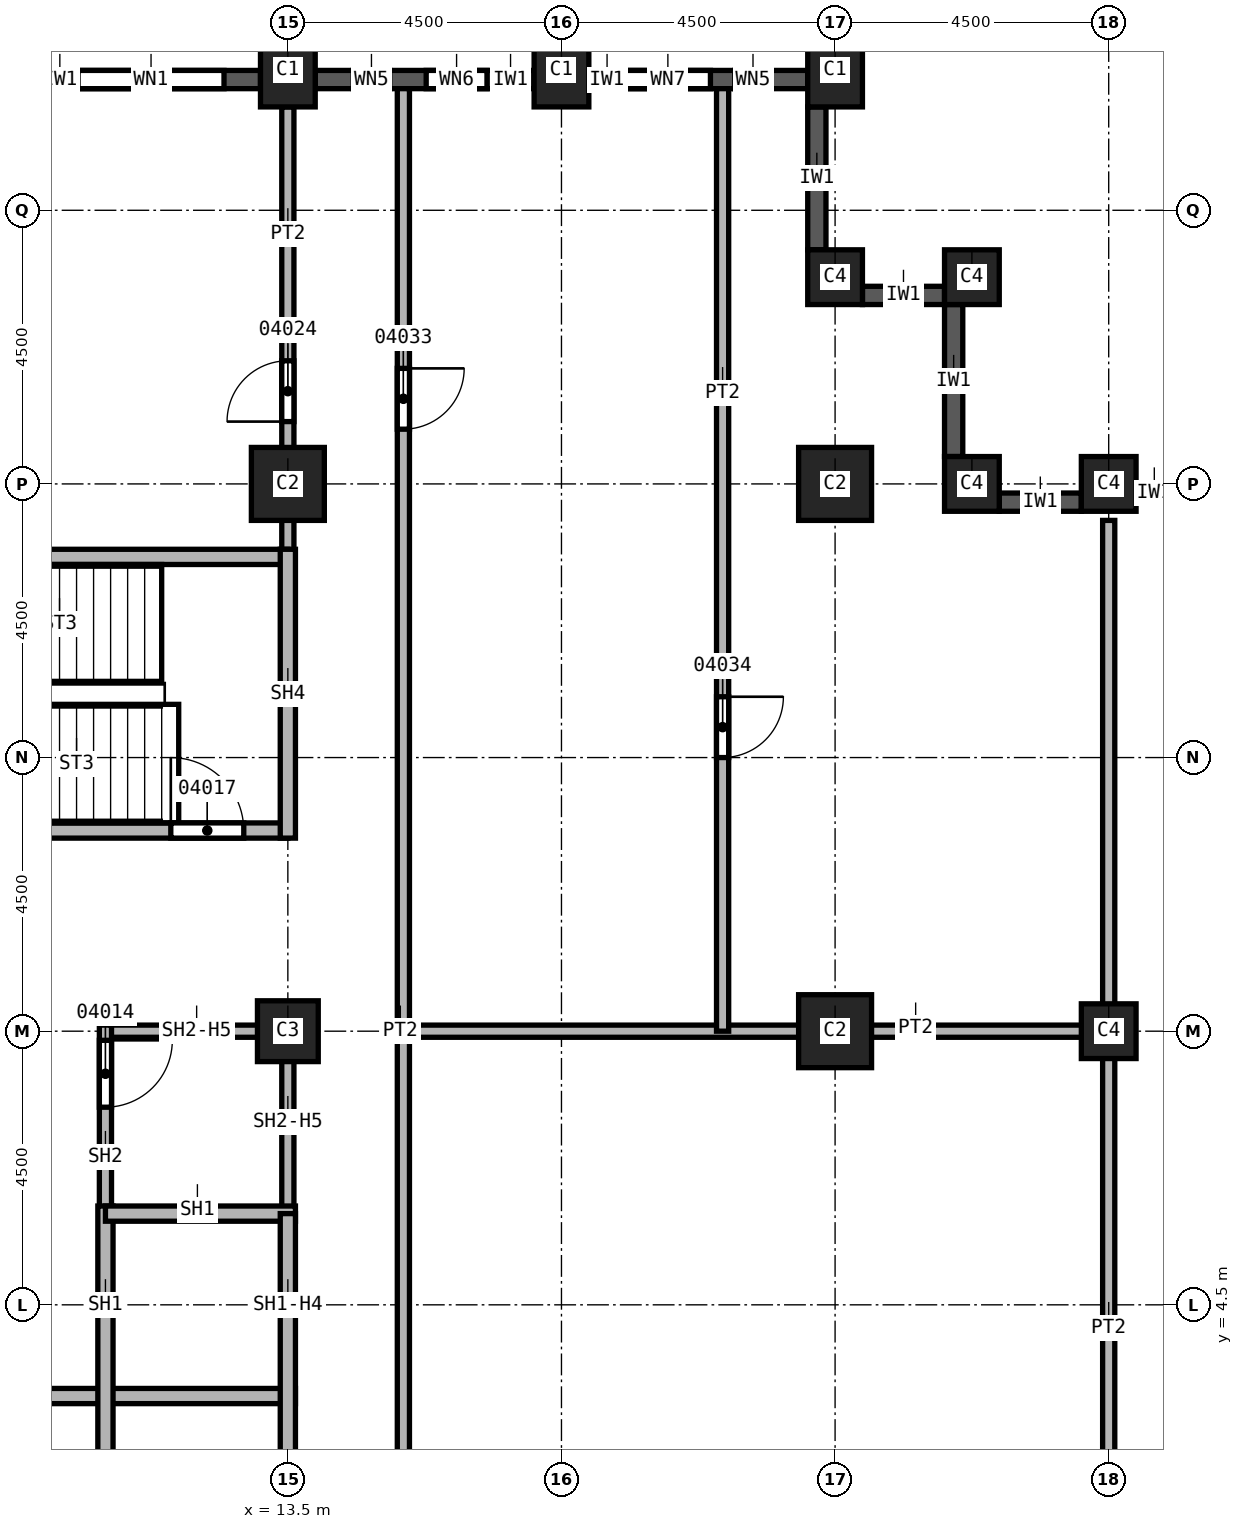
"""IFC4 building model, lengths in metres.
Left out: names, types, materials, properties, quantities, classifications, styles, units other than length and angle.
Written with IfcOpenShell. Run it as: python <this file> out.ifc"""

import sys

from ifc_helpers import new_model, si_unit, direction, frame, frame_2d, origin, origin_2d, place, context, subcontext, project, spatial, rectangle, extrude, element, fill, save


model = new_model("IFC4")
c1 = context("Model", 3, precision=1e-05, world=origin(), true_north=direction((0.0, 1.0)))
c2 = subcontext(c1, "Body", "Model", "MODEL_VIEW")
j1 = project(units=[si_unit("LENGTHUNIT", "METRE"), si_unit("PLANEANGLEUNIT", "RADIAN")], contexts=[c1])
p1 = place(None, origin())
s1 = spatial("IfcSite", under=j1, at=p1, CompositionType="ELEMENT")
p2 = place(p1, origin())
s2 = spatial("IfcBuilding", under=s1, at=p2, CompositionType="ELEMENT")
p3 = place(p2, frame((0.0, 0.0, 104.0)))
s3 = spatial("IfcBuildingStorey", under=s2, at=p3, CompositionType="ELEMENT", Elevation=104.0)
for number, where, z_axis, x_axis in (
    (1, (13.5, 18.0, 0.0), (0.0, 0.0, 1.0), (1.0, 0.0, 0.0)),
    (2, (22.5, 9.0, 0.0), (0.0, 0.0, 1.0), (1.0, 0.0, 0.0)),
    (3, (22.5, 18.0, 0.0), (0.0, 0.0, 1.0), (1.0, 0.0, 0.0)),
):
    element("IfcColumn", number, at=place(p3, frame(where, z_axis=z_axis, x_axis=x_axis)), inside=s3, PredefinedType="COLUMN", context=c2, shape_type="SweptSolid", body=[
        extrude(rectangle(XDim=1.2, YDim=1.2, at=origin_2d()), origin(), (0.0, 0.0, 1.0), 3.7),
    ])
p4 = place(p3, frame((13.5, 9.0, 0.0), z_axis=(0.0, 0.0, 1.0), x_axis=(1.0, 0.0, 0.0)))
e4 = element("IfcColumn", 4, at=p4, inside=s3, PredefinedType="COLUMN", context=c2, shape_type="SweptSolid", body=[
    extrude(rectangle(XDim=1.0, YDim=1.0, at=origin_2d()), origin(), (0.0, 0.0, 1.0), 3.7),
])
for number, where, z_axis, x_axis in (
    (5, (27.0, 9.0, 0.0), (0.0, 0.0, 1.0), (1.0, 0.0, 0.0)),
    (6, (27.0, 18.0, 0.0), (0.0, 0.0, 1.0), (1.0, 0.0, 0.0)),
):
    element("IfcColumn", number, at=place(p3, frame(where, z_axis=z_axis, x_axis=x_axis)), inside=s3, PredefinedType="COLUMN", context=c2, shape_type="SweptSolid", body=[
        extrude(rectangle(XDim=0.9, YDim=0.9, at=origin_2d()), origin(), (0.0, 0.0, 1.0), 3.7),
    ])
for number, where, z_axis, x_axis in (
    (7, (13.5, 24.8, 0.0), (0.0, 0.0, 1.0), (1.0, 0.0, 0.0)),
    (8, (18.0, 24.8, 0.0), (0.0, 0.0, 1.0), (1.0, 0.0, 0.0)),
    (9, (22.5, 24.8, 0.0), (0.0, 0.0, 1.0), (1.0, 0.0, 0.0)),
):
    element("IfcColumn", number, at=place(p3, frame(where, z_axis=z_axis, x_axis=x_axis)), inside=s3, PredefinedType="COLUMN", context=c2, shape_type="SweptSolid", body=[
        extrude(rectangle(XDim=0.9, YDim=1.2, at=origin_2d()), origin(), (0.0, 0.0, 1.0), 3.7),
    ])
for number, where, z_axis, x_axis in (
    (10, (22.5, 21.4, 0.0), (0.0, 0.0, 1.0), (1.0, 0.0, 0.0)),
    (11, (24.75, 21.4, 0.0), (0.0, 0.0, 1.0), (1.0, 0.0, 0.0)),
    (12, (24.75, 18.0, 0.0), (0.0, 0.0, 1.0), (1.0, 0.0, 0.0)),
):
    element("IfcColumn", number, at=place(p3, frame(where, z_axis=z_axis, x_axis=x_axis)), inside=s3, PredefinedType="COLUMN", context=c2, shape_type="SweptSolid", body=[
        extrude(rectangle(XDim=0.9, YDim=0.9, at=origin_2d()), origin(), (0.0, 0.0, 1.0), 3.7),
    ])
p5 = place(p3, frame((31.05, 17.85, 0.0), z_axis=(0.0, 0.0, 1.0), x_axis=(-1.0, 0.0, 0.0)))
e13 = element("IfcWall", 13, at=p5, inside=s3, PredefinedType="SOLIDWALL", context=c2, shape_type="SweptSolid", body=[
    extrude(rectangle(XDim=3.6, YDim=0.3, at=frame_2d((1.8, 0.0))), origin(), (0.0, 0.0, 1.0), 3.1),
])
p6 = place(p5, frame((0.6, 0.0, 0.8)))
e14 = element("IfcOpeningElement", 14, at=p6, cuts=e13, PredefinedType="OPENING", context=c2, shape_type="SweptSolid", body=[
    extrude(rectangle(XDim=1.0, YDim=1.95, at=frame_2d((0.5, 0.975))), frame((0.0, 0.15, 0.0), z_axis=(0.0, -1.0, 0.0), x_axis=(1.0, 0.0, 0.0)), (0.0, 0.0, 1.0), 0.3),
])
p7 = place(p5, frame((2.0, 0.0, 0.8)))
e15 = element("IfcOpeningElement", 15, at=p7, cuts=e13, PredefinedType="OPENING", context=c2, shape_type="SweptSolid", body=[
    extrude(rectangle(XDim=1.0, YDim=1.95, at=frame_2d((0.5, 0.975))), frame((0.0, 0.15, 0.0), z_axis=(0.0, -1.0, 0.0), x_axis=(1.0, 0.0, 0.0)), (0.0, 0.0, 1.0), 0.3),
])
p8 = place(p3, frame((26.55, 17.7, 0.0), z_axis=(0.0, 0.0, 1.0), x_axis=(-1.0, 0.0, 0.0)))
e16 = element("IfcWall", 16, at=p8, inside=s3, PredefinedType="SOLIDWALL", context=c2, shape_type="SweptSolid", body=[
    extrude(rectangle(XDim=1.35, YDim=0.3, at=frame_2d((0.675, 0.0))), origin(), (0.0, 0.0, 1.0), 3.1),
])
p9 = place(p3, frame((24.45, 18.45, 0.0), z_axis=(0.0, 0.0, 1.0), x_axis=(0.0, 1.0, 0.0)))
e17 = element("IfcWall", 17, at=p9, inside=s3, PredefinedType="SOLIDWALL", context=c2, shape_type="SweptSolid", body=[
    extrude(rectangle(XDim=2.5, YDim=0.3, at=frame_2d((1.25, 0.0))), origin(), (0.0, 0.0, 1.0), 3.1),
])
p10 = place(p3, frame((24.3, 21.1, 0.0), z_axis=(0.0, 0.0, 1.0), x_axis=(-1.0, 0.0, 0.0)))
e18 = element("IfcWall", 18, at=p10, inside=s3, PredefinedType="SOLIDWALL", context=c2, shape_type="SweptSolid", body=[
    extrude(rectangle(XDim=1.35, YDim=0.3, at=frame_2d((0.675, 0.0))), origin(), (0.0, 0.0, 1.0), 3.1),
])
p11 = place(p3, frame((22.2, 21.85, 0.0), z_axis=(0.0, 0.0, 1.0), x_axis=(0.0, 1.0, 0.0)))
e19 = element("IfcWall", 19, at=p11, inside=s3, PredefinedType="SOLIDWALL", context=c2, shape_type="SweptSolid", body=[
    extrude(rectangle(XDim=2.35, YDim=0.3, at=frame_2d((1.175, 0.0))), origin(), (0.0, 0.0, 1.0), 3.1),
])
p12 = place(p3, frame((22.05, 24.65, 0.0), z_axis=(0.0, 0.0, 1.0), x_axis=(-1.0, 0.0, 0.0)))
e20 = element("IfcWall", 20, at=p12, inside=s3, PredefinedType="SOLIDWALL", context=c2, shape_type="SweptSolid", body=[
    extrude(rectangle(XDim=3.6, YDim=0.3, at=frame_2d((1.8, 0.0))), origin(), (0.0, 0.0, 1.0), 3.1),
])
p13 = place(p12, frame((0.6, 0.0, 0.8)))
e21 = element("IfcOpeningElement", 21, at=p13, cuts=e20, PredefinedType="OPENING", context=c2, shape_type="SweptSolid", body=[
    extrude(rectangle(XDim=0.6, YDim=1.95, at=frame_2d((0.3, 0.975))), frame((0.0, 0.15, 0.0), z_axis=(0.0, -1.0, 0.0), x_axis=(1.0, 0.0, 0.0)), (0.0, 0.0, 1.0), 0.3),
])
p14 = place(p12, frame((1.6, 0.0, 0.8)))
e22 = element("IfcOpeningElement", 22, at=p14, cuts=e20, PredefinedType="OPENING", context=c2, shape_type="SweptSolid", body=[
    extrude(rectangle(XDim=1.4, YDim=1.95, at=frame_2d((0.7, 0.975))), frame((0.0, 0.15, 0.0), z_axis=(0.0, -1.0, 0.0), x_axis=(1.0, 0.0, 0.0)), (0.0, 0.0, 1.0), 0.3),
])
p15 = place(p3, frame((17.55, 24.65, 0.0), z_axis=(0.0, 0.0, 1.0), x_axis=(-1.0, 0.0, 0.0)))
e23 = element("IfcWall", 23, at=p15, inside=s3, PredefinedType="SOLIDWALL", context=c2, shape_type="SweptSolid", body=[
    extrude(rectangle(XDim=3.6, YDim=0.3, at=frame_2d((1.8, 0.0))), origin(), (0.0, 0.0, 1.0), 3.1),
])
p16 = place(p15, frame((0.775, 0.0, 0.8)))
e24 = element("IfcOpeningElement", 24, at=p16, cuts=e23, PredefinedType="OPENING", context=c2, shape_type="SweptSolid", body=[
    extrude(rectangle(XDim=1.0, YDim=1.95, at=frame_2d((0.5, 0.975))), frame((0.0, 0.15, 0.0), z_axis=(0.0, -1.0, 0.0), x_axis=(1.0, 0.0, 0.0)), (0.0, 0.0, 1.0), 0.3),
])
p17 = place(p15, frame((2.375, 0.0, 0.8)))
e25 = element("IfcOpeningElement", 25, at=p17, cuts=e23, PredefinedType="OPENING", context=c2, shape_type="SweptSolid", body=[
    extrude(rectangle(XDim=0.6, YDim=1.95, at=frame_2d((0.3, 0.975))), frame((0.0, 0.15, 0.0), z_axis=(0.0, -1.0, 0.0), x_axis=(1.0, 0.0, 0.0)), (0.0, 0.0, 1.0), 0.3),
])
p18 = place(p3, frame((13.05, 24.65, 0.0), z_axis=(0.0, 0.0, 1.0), x_axis=(-1.0, 0.0, 0.0)))
e26 = element("IfcWall", 26, at=p18, inside=s3, PredefinedType="SOLIDWALL", context=c2, shape_type="SweptSolid", body=[
    extrude(rectangle(XDim=3.6, YDim=0.3, at=frame_2d((1.8, 0.0))), origin(), (0.0, 0.0, 1.0), 3.1),
])
p19 = place(p18, frame((0.6, 0.0, 0.8)))
e27 = element("IfcOpeningElement", 27, at=p19, cuts=e26, PredefinedType="OPENING", context=c2, shape_type="SweptSolid", body=[
    extrude(rectangle(XDim=2.4, YDim=1.95, at=frame_2d((1.2, 0.975))), frame((0.0, 0.15, 0.0), z_axis=(0.0, -1.0, 0.0), x_axis=(1.0, 0.0, 0.0)), (0.0, 0.0, 1.0), 0.3),
])
p20 = place(p3, frame((13.5, 16.675, 0.0), z_axis=(0.0, 0.0, 1.0), x_axis=(0.0, 1.0, 0.0)))
e28 = element("IfcWall", 28, at=p20, inside=s3, PredefinedType="PARTITIONING", context=c2, shape_type="SweptSolid", body=[
    extrude(rectangle(XDim=7.525, YDim=0.2, at=frame_2d((3.762, 0.0))), origin(), (0.0, 0.0, 1.0), 3.7),
])
p21 = place(p20, frame((2.35, 0.0, 0.0)))
e29 = element("IfcOpeningElement", 29, at=p21, cuts=e28, PredefinedType="OPENING", context=c2, shape_type="SweptSolid", body=[
    extrude(rectangle(XDim=1.0, YDim=2.1, at=frame_2d((0.5, 1.05))), frame((0.0, 0.1, 0.0), z_axis=(0.0, -1.0, 0.0), x_axis=(1.0, 0.0, 0.0)), (0.0, 0.0, 1.0), 0.2),
])
p22 = place(p3, frame((15.4, 9.0, 0.0), z_axis=(0.0, 0.0, 1.0), x_axis=(1.0, 0.0, 0.0)))
e30 = element("IfcWall", 30, at=p22, inside=s3, PredefinedType="PARTITIONING", context=c2, shape_type="SweptSolid", body=[
    extrude(rectangle(XDim=11.7, YDim=0.2, at=frame_2d((5.85, 0.0))), origin(), (0.0, 0.0, 1.0), 3.7),
])
p23 = place(p3, frame((15.4, 24.5, 0.0), z_axis=(0.0, 0.0, 1.0), x_axis=(0.0, -1.0, 0.0)))
e31 = element("IfcWall", 31, at=p23, inside=s3, PredefinedType="PARTITIONING", context=c2, shape_type="SweptSolid", body=[
    extrude(rectangle(XDim=25.35, YDim=0.2, at=frame_2d((12.675, 0.0))), origin(), (0.0, 0.0, 1.0), 3.7),
])
p24 = place(p23, frame((4.6, 0.0, 0.0)))
e32 = element("IfcOpeningElement", 32, at=p24, cuts=e31, PredefinedType="OPENING", context=c2, shape_type="SweptSolid", body=[
    extrude(rectangle(XDim=1.0, YDim=2.1, at=frame_2d((0.5, 1.05))), frame((0.0, 0.1, 0.0), z_axis=(0.0, -1.0, 0.0), x_axis=(1.0, 0.0, 0.0)), (0.0, 0.0, 1.0), 0.2),
])
p25 = place(p3, frame((20.65, 24.5, 0.0), z_axis=(0.0, 0.0, 1.0), x_axis=(0.0, -1.0, 0.0)))
e33 = element("IfcWall", 33, at=p25, inside=s3, PredefinedType="PARTITIONING", context=c2, shape_type="SweptSolid", body=[
    extrude(rectangle(XDim=15.5, YDim=0.2, at=frame_2d((7.75, 0.0))), origin(), (0.0, 0.0, 1.0), 3.7),
])
p26 = place(p25, frame((10.0, 0.0, 0.0)))
e34 = element("IfcOpeningElement", 34, at=p26, cuts=e33, PredefinedType="OPENING", context=c2, shape_type="SweptSolid", body=[
    extrude(rectangle(XDim=1.0, YDim=2.1, at=frame_2d((0.5, 1.05))), frame((0.0, 0.1, 0.0), z_axis=(0.0, -1.0, 0.0), x_axis=(1.0, 0.0, 0.0)), (0.0, 0.0, 1.0), 0.2),
])
p27 = place(p3, frame((27.0, 17.4, 0.0), z_axis=(0.0, 0.0, 1.0), x_axis=(0.0, -1.0, 0.0)))
e35 = element("IfcWall", 35, at=p27, inside=s3, PredefinedType="PARTITIONING", context=c2, shape_type="SweptSolid", body=[
    extrude(rectangle(XDim=18.15, YDim=0.2, at=frame_2d((9.075, 0.0))), origin(), (0.0, 0.0, 1.0), 3.7),
])
p28 = place(p3, frame((10.5, 9.0, 0.0), z_axis=(0.0, 0.0, 1.0), x_axis=(1.0, 0.0, 0.0)))
e36 = element("IfcWall", 36, at=p28, inside=s3, PredefinedType="SOLIDWALL", context=c2, shape_type="SweptSolid", body=[
    extrude(rectangle(XDim=3.0, YDim=0.2, at=frame_2d((1.5, 0.0))), origin(), (0.0, 0.0, 1.0), 2.938),
])
p29 = place(p3, frame((10.5, 9.1, 0.0), z_axis=(0.0, 0.0, 1.0), x_axis=(0.0, -1.0, 0.0)))
e37 = element("IfcWall", 37, at=p29, inside=s3, PredefinedType="SOLIDWALL", context=c2, shape_type="SweptSolid", body=[
    extrude(rectangle(XDim=3.225, YDim=0.2, at=frame_2d((1.613, 0.0))), origin(), (0.0, 0.0, 1.0), 3.7),
])
p30 = place(p29, frame((0.25, 0.0, 0.0)))
e38 = element("IfcOpeningElement", 38, at=p30, cuts=e37, PredefinedType="OPENING", context=c2, shape_type="SweptSolid", body=[
    extrude(rectangle(XDim=1.1, YDim=2.1, at=frame_2d((0.55, 1.05))), frame((0.0, 0.1, 0.0), z_axis=(0.0, -1.0, 0.0), x_axis=(1.0, 0.0, 0.0)), (0.0, 0.0, 1.0), 0.2),
])
p31 = place(p3, frame((13.5, 9.1, 0.0), z_axis=(0.0, 0.0, 1.0), x_axis=(0.0, -1.0, 0.0)))
e39 = element("IfcWall", 39, at=p31, inside=s3, PredefinedType="SOLIDWALL", context=c2, shape_type="SweptSolid", body=[
    extrude(rectangle(XDim=3.1, YDim=0.2, at=frame_2d((1.55, 0.0))), origin(), (0.0, 0.0, 1.0), 2.938),
])
p32 = place(p3, frame((4.375, 3.0, 0.0), z_axis=(0.0, 0.0, 1.0), x_axis=(1.0, 0.0, 0.0)))
e40 = element("IfcWall", 40, at=p32, inside=s3, PredefinedType="SOLIDWALL", context=c2, shape_type="SweptSolid", body=[
    extrude(rectangle(XDim=9.25, YDim=0.25, at=frame_2d((4.625, 0.0))), origin(), (0.0, 0.0, 1.0), 3.7),
])
p33 = place(p32, frame((3.375, 0.0, 0.0)))
e41 = element("IfcOpeningElement", 41, at=p33, cuts=e40, PredefinedType="OPENING", context=c2, shape_type="SweptSolid", body=[
    extrude(rectangle(XDim=1.1, YDim=2.1, at=frame_2d((0.55, 1.05))), frame((0.0, 0.125, 0.0), z_axis=(0.0, -1.0, 0.0), x_axis=(1.0, 0.0, 0.0)), (0.0, 0.0, 1.0), 0.25),
])
p34 = place(p3, frame((10.5, 6.125, 0.0), z_axis=(0.0, 0.0, 1.0), x_axis=(0.0, -1.0, 0.0)))
e42 = element("IfcWall", 42, at=p34, inside=s3, PredefinedType="SOLIDWALL", context=c2, shape_type="SweptSolid", body=[
    extrude(rectangle(XDim=9.25, YDim=0.25, at=frame_2d((4.625, 0.0))), origin(), (0.0, 0.0, 1.0), 3.7),
])
p35 = place(p34, frame((7.075, 0.0, 0.0)))
e43 = element("IfcOpeningElement", 43, at=p35, cuts=e42, PredefinedType="OPENING", context=c2, shape_type="SweptSolid", body=[
    extrude(rectangle(XDim=1.1, YDim=2.1, at=frame_2d((0.55, 1.05))), frame((0.0, 0.125, 0.0), z_axis=(0.0, -1.0, 0.0), x_axis=(1.0, 0.0, 0.0)), (0.0, 0.0, 1.0), 0.25),
])
p36 = place(p34, frame((4.075, 0.0, 0.0)))
e44 = element("IfcOpeningElement", 44, at=p36, cuts=e42, PredefinedType="OPENING", context=c2, shape_type="SweptSolid", body=[
    extrude(rectangle(XDim=1.1, YDim=2.1, at=frame_2d((0.55, 1.05))), frame((0.0, 0.125, 0.0), z_axis=(0.0, -1.0, 0.0), x_axis=(1.0, 0.0, 0.0)), (0.0, 0.0, 1.0), 0.25),
])
p37 = place(p3, frame((10.5, 6.0, 0.0), z_axis=(0.0, 0.0, 1.0), x_axis=(1.0, 0.0, 0.0)))
e45 = element("IfcWall", 45, at=p37, inside=s3, PredefinedType="SOLIDWALL", context=c2, shape_type="SweptSolid", body=[
    extrude(rectangle(XDim=3.125, YDim=0.25, at=frame_2d((1.562, 0.0))), origin(), (0.0, 0.0, 1.0), 3.7),
])
p38 = place(p3, frame((13.5, 6.0, 0.0), z_axis=(0.0, 0.0, 1.0), x_axis=(0.0, -1.0, 0.0)))
e46 = element("IfcWall", 46, at=p38, inside=s3, PredefinedType="SOLIDWALL", context=c2, shape_type="SweptSolid", body=[
    extrude(rectangle(XDim=9.0, YDim=0.25, at=frame_2d((4.5, 0.0))), origin(), (0.0, 0.0, 1.0), 2.938),
])
p39 = place(p3, frame((4.375, 12.3, 0.0), z_axis=(0.0, 0.0, 1.0), x_axis=(1.0, 0.0, 0.0)))
e47 = element("IfcWall", 47, at=p39, inside=s3, PredefinedType="SOLIDWALL", context=c2, shape_type="SweptSolid", body=[
    extrude(rectangle(XDim=9.125, YDim=0.25, at=frame_2d((4.562, 0.0))), origin(), (0.0, 0.0, 1.0), 3.7),
])
p40 = place(p39, frame((7.2, 0.0, 0.0)))
e48 = element("IfcOpeningElement", 48, at=p40, cuts=e47, PredefinedType="OPENING", context=c2, shape_type="SweptSolid", body=[
    extrude(rectangle(XDim=1.2, YDim=2.1, at=frame_2d((0.6, 1.05))), frame((0.0, 0.125, 0.0), z_axis=(0.0, -1.0, 0.0), x_axis=(1.0, 0.0, 0.0)), (0.0, 0.0, 1.0), 0.25),
])
p41 = place(p3, frame((4.375, 16.8, 0.0), z_axis=(0.0, 0.0, 1.0), x_axis=(1.0, 0.0, 0.0)))
e49 = element("IfcWall", 49, at=p41, inside=s3, PredefinedType="SOLIDWALL", context=c2, shape_type="SweptSolid", body=[
    extrude(rectangle(XDim=9.125, YDim=0.25, at=frame_2d((4.562, 0.0))), origin(), (0.0, 0.0, 1.0), 3.7),
])
p42 = place(p3, frame((13.5, 12.175, 0.0), z_axis=(0.0, 0.0, 1.0), x_axis=(0.0, 1.0, 0.0)))
e50 = element("IfcWall", 50, at=p42, inside=s3, PredefinedType="SOLIDWALL", context=c2, shape_type="SweptSolid", body=[
    extrude(rectangle(XDim=4.75, YDim=0.25, at=frame_2d((2.375, 0.0))), origin(), (0.0, 0.0, 1.0), 3.7),
])
p43 = place(p19, origin())
e51 = element("IfcWindow", 51, at=p43, inside=s3, PartitioningType="SINGLE_PANEL", PredefinedType="WINDOW", context=c2, shape_type="SweptSolid", body=[
    extrude(rectangle(XDim=2.4, YDim=1.95, at=frame_2d((1.2, 0.975))), frame((0.0, 0.03, 0.0), z_axis=(0.0, -1.0, 0.0), x_axis=(1.0, 0.0, 0.0)), (0.0, 0.0, 1.0), 0.06),
])
fill(e27, e51)
p44 = place(p30, origin())
e52 = element("IfcDoor", 52, at=p44, inside=s3, OperationType="SINGLE_SWING_LEFT", PredefinedType="DOOR", context=c2, shape_type="SweptSolid", body=[
    extrude(rectangle(XDim=1.1, YDim=2.1, at=frame_2d((0.55, 1.05))), frame((0.0, 0.025, 0.0), z_axis=(0.0, -1.0, 0.0), x_axis=(1.0, 0.0, 0.0)), (0.0, 0.0, 1.0), 0.05),
])
fill(e38, e52)
p45 = place(p40, origin())
e53 = element("IfcDoor", 53, at=p45, inside=s3, OperationType="SINGLE_SWING_RIGHT", PredefinedType="DOOR", context=c2, shape_type="SweptSolid", body=[
    extrude(rectangle(XDim=1.2, YDim=2.1, at=frame_2d((0.6, 1.05))), frame((0.0, 0.025, 0.0), z_axis=(0.0, -1.0, 0.0), x_axis=(1.0, 0.0, 0.0)), (0.0, 0.0, 1.0), 0.05),
])
fill(e48, e53)
p46 = place(p21, origin())
e54 = element("IfcDoor", 54, at=p46, inside=s3, OperationType="SINGLE_SWING_LEFT", PredefinedType="DOOR", context=c2, shape_type="SweptSolid", body=[
    extrude(rectangle(XDim=1.0, YDim=2.1, at=frame_2d((0.5, 1.05))), frame((0.0, 0.025, 0.0), z_axis=(0.0, -1.0, 0.0), x_axis=(1.0, 0.0, 0.0)), (0.0, 0.0, 1.0), 0.05),
])
fill(e29, e54)
p47 = place(p24, origin())
e55 = element("IfcDoor", 55, at=p47, inside=s3, OperationType="SINGLE_SWING_RIGHT", PredefinedType="DOOR", context=c2, shape_type="SweptSolid", body=[
    extrude(rectangle(XDim=1.0, YDim=2.1, at=frame_2d((0.5, 1.05))), frame((0.0, 0.025, 0.0), z_axis=(0.0, -1.0, 0.0), x_axis=(1.0, 0.0, 0.0)), (0.0, 0.0, 1.0), 0.05),
])
fill(e32, e55)
p48 = place(p26, origin())
e56 = element("IfcDoor", 56, at=p48, inside=s3, OperationType="SINGLE_SWING_LEFT", PredefinedType="DOOR", context=c2, shape_type="SweptSolid", body=[
    extrude(rectangle(XDim=1.0, YDim=2.1, at=frame_2d((0.5, 1.05))), frame((0.0, 0.025, 0.0), z_axis=(0.0, -1.0, 0.0), x_axis=(1.0, 0.0, 0.0)), (0.0, 0.0, 1.0), 0.05),
])
fill(e34, e56)
p49 = place(p13, origin())
e57 = element("IfcWindow", 57, at=p49, inside=s3, PartitioningType="SINGLE_PANEL", PredefinedType="WINDOW", context=c2, shape_type="SweptSolid", body=[
    extrude(rectangle(XDim=0.6, YDim=1.95, at=frame_2d((0.3, 0.975))), frame((0.0, 0.03, 0.0), z_axis=(0.0, -1.0, 0.0), x_axis=(1.0, 0.0, 0.0)), (0.0, 0.0, 1.0), 0.06),
])
fill(e21, e57)
p50 = place(p14, origin())
e58 = element("IfcWindow", 58, at=p50, inside=s3, PartitioningType="SINGLE_PANEL", PredefinedType="WINDOW", context=c2, shape_type="SweptSolid", body=[
    extrude(rectangle(XDim=1.4, YDim=1.95, at=frame_2d((0.7, 0.975))), frame((0.0, 0.03, 0.0), z_axis=(0.0, -1.0, 0.0), x_axis=(1.0, 0.0, 0.0)), (0.0, 0.0, 1.0), 0.06),
])
fill(e22, e58)
p51 = place(p16, origin())
e59 = element("IfcWindow", 59, at=p51, inside=s3, PartitioningType="SINGLE_PANEL", PredefinedType="WINDOW", context=c2, shape_type="SweptSolid", body=[
    extrude(rectangle(XDim=1.0, YDim=1.95, at=frame_2d((0.5, 0.975))), frame((0.0, 0.03, 0.0), z_axis=(0.0, -1.0, 0.0), x_axis=(1.0, 0.0, 0.0)), (0.0, 0.0, 1.0), 0.06),
])
fill(e24, e59)
p52 = place(p17, origin())
e60 = element("IfcWindow", 60, at=p52, inside=s3, PartitioningType="SINGLE_PANEL", PredefinedType="WINDOW", context=c2, shape_type="SweptSolid", body=[
    extrude(rectangle(XDim=0.6, YDim=1.95, at=frame_2d((0.3, 0.975))), frame((0.0, 0.03, 0.0), z_axis=(0.0, -1.0, 0.0), x_axis=(1.0, 0.0, 0.0)), (0.0, 0.0, 1.0), 0.06),
])
fill(e25, e60)
save(model, sys.argv[1])
